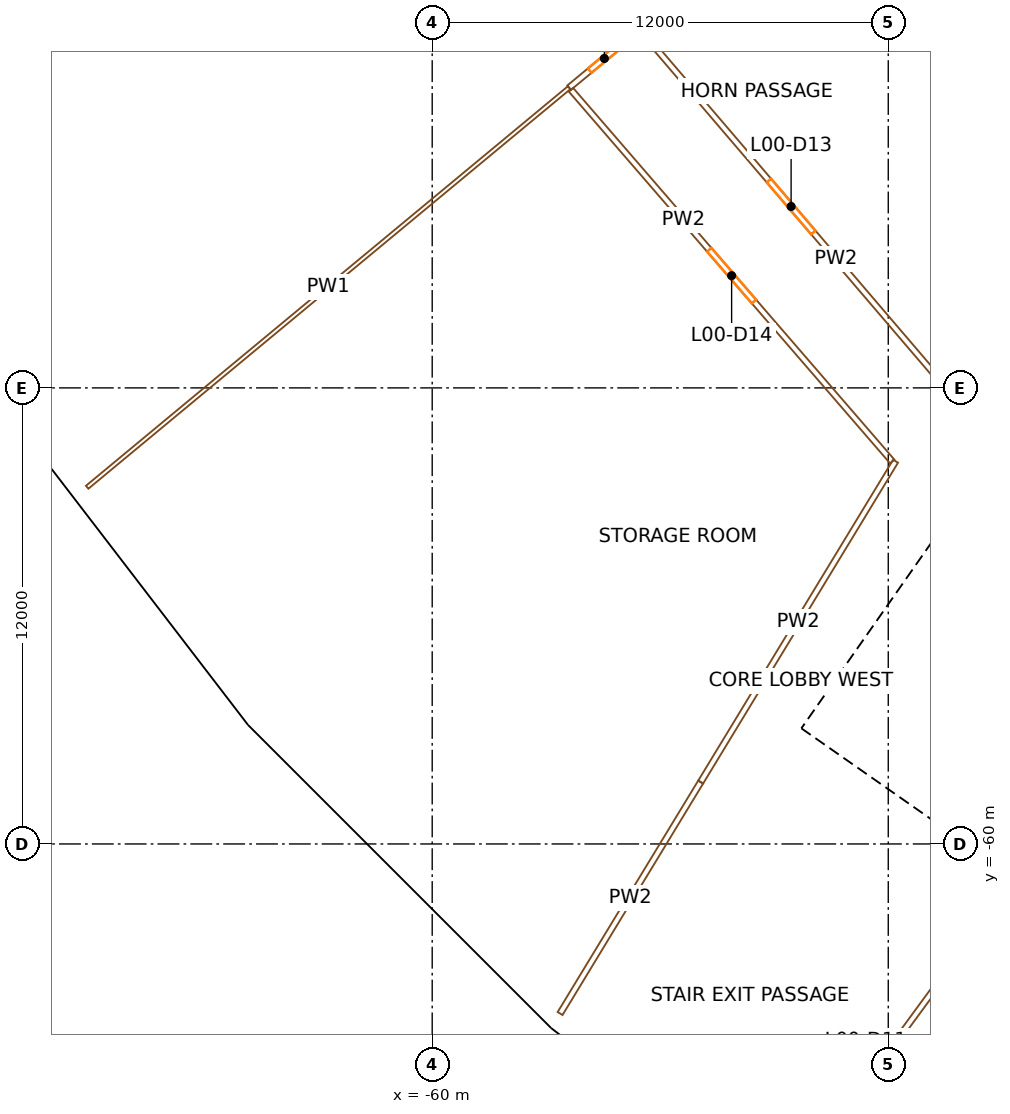
"""IFC4 building model, lengths in metres.
Left out: names, types, materials, properties, quantities, classifications, styles, units other than length and angle.
Written with IfcOpenShell. Run it as: python <this file> out.ifc"""

import sys

from ifc_helpers import new_model, si_unit, direction, frame, frame_2d, origin, origin_2d, place, context, subcontext, project, spatial, rectangle, extrude, element, fill, save


model = new_model("IFC4")
c1 = context("Model", 3, precision=1e-05, world=origin(), true_north=direction((0.0, 1.0)))
c2 = subcontext(c1, "Body", "Model", "MODEL_VIEW")
j1 = project(units=[si_unit("LENGTHUNIT", "METRE"), si_unit("PLANEANGLEUNIT", "RADIAN")], contexts=[c1])
p1 = place(None, origin())
s1 = spatial("IfcSite", under=j1, at=p1, CompositionType="ELEMENT")
p2 = place(p1, origin())
s2 = spatial("IfcBuilding", under=s1, at=p2, CompositionType="ELEMENT")
p3 = place(p2, origin())
s3 = spatial("IfcBuildingStorey", under=s2, at=p3, CompositionType="ELEMENT", Elevation=0.0)
for number, where, z_axis, x_axis in (
    (1, (-64.647, -43.196, -0.4), (0.0, 0.0, 1.0), (0.556, -0.831, 0.0)),
    (2, (-58.456, -51.264, -0.4), (0.0, 0.0, 1.0), (0.659, -0.752, 0.0)),
):
    element("IfcColumn", number, at=place(p3, frame(where, z_axis=z_axis, x_axis=x_axis)), inside=s3, PredefinedType="COLUMN", context=c2, shape_type="SweptSolid", body=[
        extrude(rectangle(XDim=1.4, YDim=1.8, at=origin_2d()), origin(), (0.0, 0.0, 1.0), 9.4),
    ])
p4 = place(p3, frame((-64.094, -56.209, -0.4), z_axis=(0.0, 0.0, 1.0), x_axis=(0.6593458151, -0.751839807479, 0.0)))
e3 = element("IfcColumn", 3, at=p4, inside=s3, PredefinedType="COLUMN", context=c2, shape_type="SweptSolid", body=[
    extrude(rectangle(XDim=1.1, YDim=1.3, at=origin_2d()), origin(), (0.0, 0.0, 1.0), 9.4),
])
p5 = place(p3, frame((-51.264, -58.456, -0.4), z_axis=(0.0, 0.0, 1.0), x_axis=(0.751839807479, -0.6593458151, 0.0)))
e4 = element("IfcColumn", 4, at=p5, inside=s3, PredefinedType="COLUMN", context=c2, shape_type="SweptSolid", body=[
    extrude(rectangle(XDim=1.4, YDim=1.8, at=origin_2d()), origin(), (0.0, 0.0, 1.0), 9.4),
])
p6 = place(p3, frame((-56.209, -64.094, -0.4), z_axis=(0.0, 0.0, 1.0), x_axis=(0.751839807479, -0.6593458151, 0.0)))
e5 = element("IfcColumn", 5, at=p6, inside=s3, PredefinedType="COLUMN", context=c2, shape_type="SweptSolid", body=[
    extrude(rectangle(XDim=1.1, YDim=1.3, at=origin_2d()), origin(), (0.0, 0.0, 1.0), 9.4),
])
p7 = place(p3, frame((-49.779, -57.191, 0.0), z_axis=(0.0, 0.0, 1.0), x_axis=(0.573577477574, 0.819151315216, 0.0)))
e6 = element("IfcWall", 6, at=p7, inside=s3, PredefinedType="SHEAR", context=c2, shape_type="SweptSolid", body=[
    extrude(rectangle(XDim=14.8, YDim=0.9, at=frame_2d((7.4, 0.0))), origin(), (0.0, 0.0, 1.0), 8.6),
])
p8 = place(p7, frame((6.7, 0.0, 0.0)))
e7 = element("IfcOpeningElement", 7, at=p8, cuts=e6, PredefinedType="OPENING", context=c2, shape_type="SweptSolid", body=[
    extrude(rectangle(XDim=1.4, YDim=2.1, at=frame_2d((0.7, 1.05))), frame((0.0, 0.46, 0.0), z_axis=(0.0, -1.0, 0.0), x_axis=(1.0, 0.0, 0.0)), (0.0, 0.0, 1.0), 0.92),
])
p9 = place(p3, frame((-36.827, -65.71, 0.0), z_axis=(0.0, 0.0, 1.0), x_axis=(-0.819153391756, 0.573574511963, 0.0)))
e8 = element("IfcWall", 8, at=p9, inside=s3, PredefinedType="SHEAR", context=c2, shape_type="SweptSolid", body=[
    extrude(rectangle(XDim=15.045, YDim=0.9, at=frame_2d((7.523, 0.0))), origin(), (0.0, 0.0, 1.0), 8.6),
])
p10 = place(p9, frame((0.8, 0.0, 0.0)))
e9 = element("IfcOpeningElement", 9, at=p10, cuts=e8, PredefinedType="OPENING", context=c2, shape_type="SweptSolid", body=[
    extrude(rectangle(XDim=1.0, YDim=2.1, at=frame_2d((0.5, 1.05))), frame((0.0, 0.46, 0.0), z_axis=(0.0, -1.0, 0.0), x_axis=(1.0, 0.0, 0.0)), (0.0, 0.0, 1.0), 0.92),
])
p11 = place(p9, frame((3.475, 0.0, 0.0)))
e10 = element("IfcOpeningElement", 10, at=p11, cuts=e8, PredefinedType="OPENING", context=c2, shape_type="SweptSolid", body=[
    extrude(rectangle(XDim=1.0, YDim=2.1, at=frame_2d((0.5, 1.05))), frame((0.0, 0.46, 0.0), z_axis=(0.0, -1.0, 0.0), x_axis=(1.0, 0.0, 0.0)), (0.0, 0.0, 1.0), 0.92),
])
p12 = place(p9, frame((6.175, 0.0, 0.0)))
e11 = element("IfcOpeningElement", 11, at=p12, cuts=e8, PredefinedType="OPENING", context=c2, shape_type="SweptSolid", body=[
    extrude(rectangle(XDim=1.0, YDim=2.1, at=frame_2d((0.5, 1.05))), frame((0.0, 0.46, 0.0), z_axis=(0.0, -1.0, 0.0), x_axis=(1.0, 0.0, 0.0)), (0.0, 0.0, 1.0), 0.92),
])
p13 = place(p9, frame((13.495, 0.0, 0.0)))
e12 = element("IfcOpeningElement", 12, at=p13, cuts=e8, PredefinedType="OPENING", context=c2, shape_type="SweptSolid", body=[
    extrude(rectangle(XDim=1.1, YDim=2.1, at=frame_2d((0.55, 1.05))), frame((0.0, 0.46, 0.0), z_axis=(0.0, -1.0, 0.0), x_axis=(1.0, 0.0, 0.0)), (0.0, 0.0, 1.0), 0.92),
])
p14 = place(p3, frame((-41.262, -57.661, 0.0), z_axis=(0.0, 0.0, 1.0), x_axis=(-0.819164398642, 0.573558792102, 0.0)))
e13 = element("IfcWall", 13, at=p14, inside=s3, PredefinedType="SOLIDWALL", context=c2, shape_type="SweptSolid", body=[
    extrude(rectangle(XDim=6.795, YDim=0.3, at=frame_2d((3.397, 0.0))), origin(), (0.0, 0.0, 1.0), 8.6),
])
p15 = place(p14, frame((5.32, 0.0, 0.0)))
e14 = element("IfcOpeningElement", 14, at=p15, cuts=e13, PredefinedType="OPENING", context=c2, shape_type="SweptSolid", body=[
    extrude(rectangle(XDim=1.1, YDim=2.1, at=frame_2d((0.55, 1.05))), frame((0.0, 0.16, 0.0), z_axis=(0.0, -1.0, 0.0), x_axis=(1.0, 0.0, 0.0)), (0.0, 0.0, 1.0), 0.32),
])
p16 = place(p3, frame((-47.065, -56.192, 0.0), z_axis=(0.0, 0.0, 1.0), x_axis=(0.573822822947, 0.818979467304, 0.0)))
e15 = element("IfcWall", 15, at=p16, inside=s3, PredefinedType="SOLIDWALL", context=c2, shape_type="SweptSolid", body=[
    extrude(rectangle(XDim=0.5, YDim=0.3, at=frame_2d((0.25, 0.0))), origin(), (0.0, 0.0, 1.0), 4.3),
])
p17 = place(p3, frame((-71.491, -47.839, 0.0), z_axis=(0.0, 0.0, 1.0), x_axis=(0.608758773695, -0.793355377778, 0.0)))
e16 = element("IfcWall", 16, at=p17, inside=s3, PredefinedType="SOLIDWALL", context=c2, shape_type="SweptSolid", body=[
    extrude(rectangle(XDim=11.135, YDim=0.45, at=frame_2d((5.567, 0.0))), origin(), (0.0, 0.0, 1.0), 7.7),
])
p18 = place(p17, frame((4.967, 0.0, 0.0)))
e17 = element("IfcOpeningElement", 17, at=p18, cuts=e16, PredefinedType="OPENING", context=c2, shape_type="SweptSolid", body=[
    extrude(rectangle(XDim=1.2, YDim=2.4, at=frame_2d((0.6, 1.2))), frame((0.0, 0.235, 0.0), z_axis=(0.0, -1.0, 0.0), x_axis=(1.0, 0.0, 0.0)), (0.0, 0.0, 1.0), 0.47),
])
p19 = place(p3, frame((-64.698, -56.699, 0.0), z_axis=(0.0, 0.0, 1.0), x_axis=(0.707106781187, -0.707106781187, 0.0)))
e18 = element("IfcWall", 18, at=p19, inside=s3, PredefinedType="SOLIDWALL", context=c2, shape_type="SweptSolid", body=[
    extrude(rectangle(XDim=11.312, YDim=0.45, at=frame_2d((5.656, 0.0))), origin(), (0.0, 0.0, 1.0), 7.7),
])
p20 = place(p19, frame((4.756, 0.0, 0.0)))
e19 = element("IfcOpeningElement", 19, at=p20, cuts=e18, PredefinedType="OPENING", context=c2, shape_type="SweptSolid", body=[
    extrude(rectangle(XDim=1.8, YDim=2.4, at=frame_2d((0.9, 1.2))), frame((0.0, 0.235, 0.0), z_axis=(0.0, -1.0, 0.0), x_axis=(1.0, 0.0, 0.0)), (0.0, 0.0, 1.0), 0.47),
])
p21 = place(p3, frame((-56.673, -64.713, 0.0), z_axis=(0.0, 0.0, 1.0), x_axis=(0.793355377778, -0.608758773695, 0.0)))
e20 = element("IfcWall", 20, at=p21, inside=s3, PredefinedType="SOLIDWALL", context=c2, shape_type="SweptSolid", body=[
    extrude(rectangle(XDim=11.135, YDim=0.45, at=frame_2d((5.567, 0.0))), origin(), (0.0, 0.0, 1.0), 7.7),
])
p22 = place(p21, frame((3.396, 0.0, 0.0), z_axis=(0.0, 0.0, 1.0), x_axis=(-1.0, 0.0, 0.0)))
e21 = element("IfcOpeningElement", 21, at=p22, cuts=e20, PredefinedType="OPENING", context=c2, shape_type="SweptSolid", body=[
    extrude(rectangle(XDim=1.2, YDim=2.4, at=frame_2d((0.6, 1.2))), frame((0.0, 0.235, 0.0), z_axis=(0.0, -1.0, 0.0), x_axis=(1.0, 0.0, 0.0)), (0.0, 0.0, 1.0), 0.47),
])
p23 = place(p3, frame((-69.078, -50.614, 0.0), z_axis=(0.0, 0.0, 1.0), x_axis=(0.769847826177, 0.638227486505, 0.0)))
e22 = element("IfcWall", 22, at=p23, inside=s3, PredefinedType="PARTITIONING", context=c2, shape_type="SweptSolid", body=[
    extrude(rectangle(XDim=16.473, YDim=0.1, at=frame_2d((8.237, 0.0))), origin(), (0.0, 0.0, 1.0), 7.6),
])
p24 = place(p3, frame((-56.396, -40.101, 0.0), z_axis=(0.0, 0.0, 1.0), x_axis=(0.769873446727, 0.63819658102, 0.0)))
e23 = element("IfcWall", 23, at=p24, inside=s3, PredefinedType="PARTITIONING", context=c2, shape_type="SweptSolid", body=[
    extrude(rectangle(XDim=2.406, YDim=0.15, at=frame_2d((1.203, 0.0))), origin(), (0.0, 0.0, 1.0), 7.6),
])
p25 = place(p24, frame((0.703, 0.0, 0.0)))
e24 = element("IfcOpeningElement", 24, at=p25, cuts=e23, PredefinedType="OPENING", context=c2, shape_type="SweptSolid", body=[
    extrude(rectangle(XDim=1.0, YDim=2.1, at=frame_2d((0.5, 1.05))), frame((0.0, 0.085, 0.0), z_axis=(0.0, -1.0, 0.0), x_axis=(1.0, 0.0, 0.0)), (0.0, 0.0, 1.0), 0.17),
])
p26 = place(p3, frame((-52.937, -58.374, 0.0), z_axis=(0.0, 0.0, 1.0), x_axis=(-0.519165960752, -0.854673449451, 0.0)))
e25 = element("IfcWall", 25, at=p26, inside=s3, PredefinedType="PARTITIONING", context=c2, shape_type="SweptSolid", body=[
    extrude(rectangle(XDim=7.123, YDim=0.15, at=frame_2d((3.561, 0.0))), origin(), (0.0, 0.0, 1.0), 7.6),
])
p27 = place(p3, frame((-46.549, -63.489, 0.0), z_axis=(0.0, 0.0, 1.0), x_axis=(-0.591288618584, -0.806460023518, 0.0)))
e26 = element("IfcWall", 26, at=p27, inside=s3, PredefinedType="PARTITIONING", context=c2, shape_type="SweptSolid", body=[
    extrude(rectangle(XDim=6.911, YDim=0.15, at=frame_2d((3.456, 0.0))), origin(), (0.0, 0.0, 1.0), 7.6),
])
p28 = place(p27, frame((3.005, 0.0, 0.0)))
e27 = element("IfcOpeningElement", 27, at=p28, cuts=e26, PredefinedType="OPENING", context=c2, shape_type="SweptSolid", body=[
    extrude(rectangle(XDim=0.9, YDim=2.1, at=frame_2d((0.45, 1.05))), frame((0.0, 0.085, 0.0), z_axis=(0.0, -1.0, 0.0), x_axis=(1.0, 0.0, 0.0)), (0.0, 0.0, 1.0), 0.17),
])
p29 = place(p3, frame((-47.896, -49.937, 0.0), z_axis=(0.0, 0.0, 1.0), x_axis=(-0.653903077734, 0.756578327029, 0.0)))
e28 = element("IfcWall", 28, at=p29, inside=s3, PredefinedType="PARTITIONING", context=c2, shape_type="SweptSolid", body=[
    extrude(rectangle(XDim=12.926, YDim=0.15, at=frame_2d((6.463, 0.0))), origin(), (0.0, 0.0, 1.0), 7.6),
])
p30 = place(p29, frame((5.563, 0.0, 0.0)))
e29 = element("IfcOpeningElement", 29, at=p30, cuts=e28, PredefinedType="OPENING", context=c2, shape_type="SweptSolid", body=[
    extrude(rectangle(XDim=1.8, YDim=2.1, at=frame_2d((0.9, 1.05))), frame((0.0, 0.085, 0.0), z_axis=(0.0, -1.0, 0.0), x_axis=(1.0, 0.0, 0.0)), (0.0, 0.0, 1.0), 0.17),
])
p31 = place(p3, frame((-47.808, -49.929, 0.0), z_axis=(0.0, 0.0, 1.0), x_axis=(-0.51915296508, -0.854681343454, 0.0)))
e30 = element("IfcWall", 30, at=p31, inside=s3, PredefinedType="PARTITIONING", context=c2, shape_type="SweptSolid", body=[
    extrude(rectangle(XDim=9.875, YDim=0.15, at=frame_2d((4.938, 0.0))), origin(), (0.0, 0.0, 1.0), 7.6),
])
p32 = place(p3, frame((-54.495, -38.622, 0.0), z_axis=(0.0, 0.0, 1.0), x_axis=(0.649856980775, -0.760056514042, 0.0)))
e31 = element("IfcWall", 31, at=p32, inside=s3, PredefinedType="PARTITIONING", context=c2, shape_type="SweptSolid", body=[
    extrude(rectangle(XDim=12.121, YDim=0.15, at=frame_2d((6.06, 0.0))), origin(), (0.0, 0.0, 1.0), 7.6),
])
p33 = place(p32, frame((5.16, 0.0, 0.0)))
e32 = element("IfcOpeningElement", 32, at=p33, cuts=e31, PredefinedType="OPENING", context=c2, shape_type="SweptSolid", body=[
    extrude(rectangle(XDim=1.8, YDim=2.1, at=frame_2d((0.9, 1.05))), frame((0.0, 0.085, 0.0), z_axis=(0.0, -1.0, 0.0), x_axis=(1.0, 0.0, 0.0)), (0.0, 0.0, 1.0), 0.17),
])
p34 = place(p13, origin())
e33 = element("IfcDoor", 33, at=p34, inside=s3, OperationType="SINGLE_SWING_LEFT", PredefinedType="DOOR", context=c2, shape_type="SweptSolid", body=[
    extrude(rectangle(XDim=1.1, YDim=2.1, at=frame_2d((0.55, 1.05))), frame((0.0, 0.025, 0.0), z_axis=(0.0, -1.0, 0.0), x_axis=(1.0, 0.0, 0.0)), (0.0, 0.0, 1.0), 0.05),
])
fill(e12, e33)
p35 = place(p18, origin())
e34 = element("IfcDoor", 34, at=p35, inside=s3, OperationType="SINGLE_SWING_LEFT", PredefinedType="DOOR", context=c2, shape_type="SweptSolid", body=[
    extrude(rectangle(XDim=1.2, YDim=2.4, at=frame_2d((0.6, 1.2))), frame((0.0, 0.025, 0.0), z_axis=(0.0, -1.0, 0.0), x_axis=(1.0, 0.0, 0.0)), (0.0, 0.0, 1.0), 0.05),
])
fill(e17, e34)
p36 = place(p20, origin())
e35 = element("IfcDoor", 35, at=p36, inside=s3, OperationType="DOUBLE_DOOR_DOUBLE_SWING", PredefinedType="DOOR", context=c2, shape_type="SweptSolid", body=[
    extrude(rectangle(XDim=1.8, YDim=2.4, at=frame_2d((0.9, 1.2))), frame((0.0, 0.025, 0.0), z_axis=(0.0, -1.0, 0.0), x_axis=(1.0, 0.0, 0.0)), (0.0, 0.0, 1.0), 0.05),
])
fill(e19, e35)
p37 = place(p33, origin())
e36 = element("IfcDoor", 36, at=p37, inside=s3, OperationType="DOUBLE_DOOR_SINGLE_SWING", PredefinedType="DOOR", context=c2, shape_type="SweptSolid", body=[
    extrude(rectangle(XDim=1.8, YDim=2.1, at=frame_2d((0.9, 1.05))), frame((0.0, 0.025, 0.0), z_axis=(0.0, -1.0, 0.0), x_axis=(1.0, 0.0, 0.0)), (0.0, 0.0, 1.0), 0.05),
])
fill(e32, e36)
p38 = place(p30, origin())
e37 = element("IfcDoor", 37, at=p38, inside=s3, OperationType="DOUBLE_DOOR_SINGLE_SWING", PredefinedType="DOOR", context=c2, shape_type="SweptSolid", body=[
    extrude(rectangle(XDim=1.8, YDim=2.1, at=frame_2d((0.9, 1.05))), frame((0.0, 0.025, 0.0), z_axis=(0.0, -1.0, 0.0), x_axis=(1.0, 0.0, 0.0)), (0.0, 0.0, 1.0), 0.05),
])
fill(e29, e37)
p39 = place(p25, origin())
e38 = element("IfcDoor", 38, at=p39, inside=s3, OperationType="SINGLE_SWING_RIGHT", PredefinedType="DOOR", context=c2, shape_type="SweptSolid", body=[
    extrude(rectangle(XDim=1.0, YDim=2.1, at=frame_2d((0.5, 1.05))), frame((0.0, 0.025, 0.0), z_axis=(0.0, -1.0, 0.0), x_axis=(1.0, 0.0, 0.0)), (0.0, 0.0, 1.0), 0.05),
])
fill(e24, e38)
save(model, sys.argv[1])
